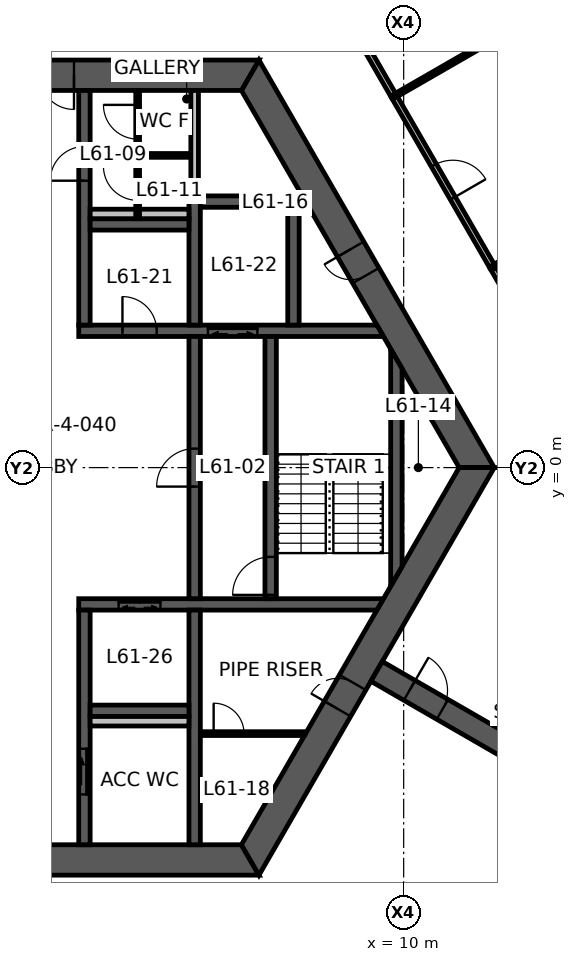
"""IFC4 building model, lengths in metres.
Left out: names, types, materials, properties, quantities, classifications, styles, units other than length and angle.
Written with IfcOpenShell. Run it as: python <this file> out.ifc"""

import sys

from ifc_helpers import new_model, si_unit, direction, frame, frame_2d, origin, place, context, subcontext, project, spatial, polyline, rectangle, outline, extrude, element, fill, save


model = new_model("IFC4")
c1 = context("Model", 3, precision=1e-05, world=origin(), true_north=direction((0.0, 1.0)))
c2 = subcontext(c1, "Body", "Model", "MODEL_VIEW")
j1 = project(units=[si_unit("LENGTHUNIT", "METRE"), si_unit("PLANEANGLEUNIT", "RADIAN")], contexts=[c1])
p1 = place(None, origin())
s1 = spatial("IfcSite", under=j1, at=p1, CompositionType="ELEMENT")
p2 = place(p1, origin())
s2 = spatial("IfcBuilding", under=s1, at=p2, CompositionType="ELEMENT")
p3 = place(p2, frame((0.0, 0.0, 244.0)))
s3 = spatial("IfcBuildingStorey", under=s2, at=p3, CompositionType="ELEMENT", Elevation=244.0)
p4 = place(p3, frame((11.922, 0.0, 0.0), z_axis=(0.0, 0.0, 1.0), x_axis=(-0.500004296715, 0.866022923061, 0.0)))
e1 = element("IfcWall", 1, at=p4, inside=s3, PredefinedType="SHEAR", context=c2, shape_type="SweptSolid", body=[
    extrude(outline(polyline([(-0.231, -0.4), (5.835, -0.4), (6.635, -0.4), (12.153, -0.4), (11.691, 0.4), (6.635, 0.4), (5.835, 0.4), (0.231, 0.4), (-0.231, -0.4)])), origin(), (0.0, 0.0, 1.0), 3.9),
])
p5 = place(p4, frame((5.835, 0.0, 0.0)))
e2 = element("IfcOpeningElement", 2, at=p5, cuts=e1, PredefinedType="OPENING", context=c2, shape_type="SweptSolid", body=[
    extrude(rectangle(XDim=0.8, YDim=2.1, at=frame_2d((0.4, 1.05))), frame((0.0, 0.41, 0.0), z_axis=(0.0, -1.0, 0.0), x_axis=(1.0, 0.0, 0.0)), (0.0, 0.0, 1.0), 0.82),
])
p6 = place(p3, frame((5.961, 10.325, 0.0), z_axis=(0.0, 0.0, 1.0), x_axis=(-1.0, 0.0, 0.0)))
e3 = element("IfcWall", 3, at=p6, inside=s3, PredefinedType="SHEAR", context=c2, shape_type="SweptSolid", body=[
    extrude(outline(polyline([(-0.231, -0.4), (4.636, -0.4), (5.536, -0.4), (6.386, -0.4), (7.286, -0.4), (12.153, -0.4), (11.691, 0.4), (7.286, 0.4), (6.386, 0.4), (5.536, 0.4), (4.636, 0.4), (0.231, 0.4), (-0.231, -0.4)])), origin(), (0.0, 0.0, 1.0), 3.9),
])
p7 = place(p6, frame((6.386, 0.0, 0.0)))
e4 = element("IfcOpeningElement", 4, at=p7, cuts=e3, PredefinedType="OPENING", context=c2, shape_type="SweptSolid", body=[
    extrude(rectangle(XDim=0.9, YDim=2.1, at=frame_2d((0.45, 1.05))), frame((0.0, 0.41, 0.0), z_axis=(0.0, -1.0, 0.0), x_axis=(1.0, 0.0, 0.0)), (0.0, 0.0, 1.0), 0.82),
])
p8 = place(p6, frame((4.636, 0.0, 0.0)))
e5 = element("IfcOpeningElement", 5, at=p8, cuts=e3, PredefinedType="OPENING", context=c2, shape_type="SweptSolid", body=[
    extrude(rectangle(XDim=0.9, YDim=2.1, at=frame_2d((0.45, 1.05))), frame((0.0, 0.41, 0.0), z_axis=(0.0, -1.0, 0.0), x_axis=(1.0, 0.0, 0.0)), (0.0, 0.0, 1.0), 0.82),
])
p9 = place(p3, frame((-5.961, -10.325, 0.0), z_axis=(0.0, 0.0, 1.0), x_axis=(1.0, 0.0, 0.0)))
e6 = element("IfcWall", 6, at=p9, inside=s3, PredefinedType="SHEAR", context=c2, shape_type="SweptSolid", body=[
    extrude(outline(polyline([(-0.231, -0.4), (5.461, -0.4), (6.461, -0.4), (12.153, -0.4), (11.691, 0.4), (6.461, 0.4), (5.461, 0.4), (0.231, 0.4), (-0.231, -0.4)])), origin(), (0.0, 0.0, 1.0), 3.9),
])
p10 = place(p9, frame((5.461, 0.0, 0.0)))
e7 = element("IfcOpeningElement", 7, at=p10, cuts=e6, PredefinedType="OPENING", context=c2, shape_type="SweptSolid", body=[
    extrude(rectangle(XDim=1.0, YDim=2.1, at=frame_2d((0.5, 1.05))), frame((0.0, 0.41, 0.0), z_axis=(0.0, -1.0, 0.0), x_axis=(1.0, 0.0, 0.0)), (0.0, 0.0, 1.0), 0.82),
])
p11 = place(p3, frame((5.961, -10.325, 0.0), z_axis=(0.0, 0.0, 1.0), x_axis=(0.500004296715, 0.866022923061, 0.0)))
e8 = element("IfcWall", 8, at=p11, inside=s3, PredefinedType="SHEAR", context=c2, shape_type="SweptSolid", body=[
    extrude(outline(polyline([(-0.231, -0.4), (4.594, -0.4), (5.394, -0.4), (12.153, -0.4), (11.691, 0.4), (5.394, 0.4), (4.594, 0.4), (0.231, 0.4), (-0.231, -0.4)])), origin(), (0.0, 0.0, 1.0), 3.9),
])
p12 = place(p11, frame((4.594, 0.0, 0.0)))
e9 = element("IfcOpeningElement", 9, at=p12, cuts=e8, PredefinedType="OPENING", context=c2, shape_type="SweptSolid", body=[
    extrude(rectangle(XDim=0.8, YDim=2.1, at=frame_2d((0.4, 1.05))), frame((0.0, 0.41, 0.0), z_axis=(0.0, -1.0, 0.0), x_axis=(1.0, 0.0, 0.0)), (0.0, 0.0, 1.0), 0.82),
])
p13 = place(p3, frame((9.288, -5.363, 0.0), z_axis=(0.0, 0.0, 1.0), x_axis=(0.866031736626, -0.499989031036, 0.0)))
e10 = element("IfcWall", 10, at=p13, inside=s3, PredefinedType="SHEAR", context=c2, shape_type="SweptSolid", body=[
    extrude(rectangle(XDim=7.796, YDim=0.6, at=frame_2d((3.898, 0.0))), origin(), (0.0, 0.0, 1.0), 3.9),
])
p14 = place(p13, frame((1.0, 0.0, 0.0)))
e11 = element("IfcOpeningElement", 11, at=p14, cuts=e10, PredefinedType="OPENING", context=c2, shape_type="SweptSolid", body=[
    extrude(rectangle(XDim=1.0, YDim=2.1, at=frame_2d((0.5, 1.05))), frame((0.0, 0.31, 0.0), z_axis=(0.0, -1.0, 0.0), x_axis=(1.0, 0.0, 0.0)), (0.0, 0.0, 1.0), 0.62),
])
p15 = place(p3, frame((1.45, 3.6, 0.0), z_axis=(0.0, 0.0, 1.0), x_axis=(1.0, 0.0, 0.0)))
e12 = element("IfcWall", 12, at=p15, inside=s3, PredefinedType="SHEAR", context=c2, shape_type="SweptSolid", body=[
    extrude(outline(polyline([(0.0, -0.15), (1.15, -0.15), (2.05, -0.15), (3.4, -0.15), (4.7, -0.15), (8.019, -0.15), (7.845, 0.15), (4.7, 0.15), (3.4, 0.15), (2.05, 0.15), (1.15, 0.15), (0.0, 0.15), (0.0, -0.15)])), origin(), (0.0, 0.0, 1.0), 3.9),
])
p16 = place(p15, frame((1.15, 0.0, 0.0)))
e13 = element("IfcOpeningElement", 13, at=p16, cuts=e12, PredefinedType="OPENING", context=c2, shape_type="SweptSolid", body=[
    extrude(rectangle(XDim=0.9, YDim=2.1, at=frame_2d((0.45, 1.05))), frame((0.0, 0.16, 0.0), z_axis=(0.0, -1.0, 0.0), x_axis=(1.0, 0.0, 0.0)), (0.0, 0.0, 1.0), 0.32),
])
p17 = place(p15, frame((3.4, 0.0, 0.0)))
e14 = element("IfcOpeningElement", 14, at=p17, cuts=e12, PredefinedType="OPENING", context=c2, shape_type="SweptSolid", body=[
    extrude(rectangle(XDim=1.3, YDim=2.1, at=frame_2d((0.65, 1.05))), frame((0.0, 0.16, 0.0), z_axis=(0.0, -1.0, 0.0), x_axis=(1.0, 0.0, 0.0)), (0.0, 0.0, 1.0), 0.32),
])
p18 = place(p3, frame((1.45, -3.6, 0.0), z_axis=(0.0, 0.0, 1.0), x_axis=(1.0, 0.0, 0.0)))
e15 = element("IfcWall", 15, at=p18, inside=s3, PredefinedType="SHEAR", context=c2, shape_type="SweptSolid", body=[
    extrude(outline(polyline([(0.0, -0.15), (1.05, -0.15), (2.15, -0.15), (7.845, -0.15), (8.019, 0.15), (2.15, 0.15), (1.05, 0.15), (0.0, 0.15), (0.0, -0.15)])), origin(), (0.0, 0.0, 1.0), 3.9),
])
p19 = place(p18, frame((1.05, 0.0, 0.0)))
e16 = element("IfcOpeningElement", 16, at=p19, cuts=e15, PredefinedType="OPENING", context=c2, shape_type="SweptSolid", body=[
    extrude(rectangle(XDim=1.1, YDim=2.1, at=frame_2d((0.55, 1.05))), frame((0.0, 0.16, 0.0), z_axis=(0.0, -1.0, 0.0), x_axis=(1.0, 0.0, 0.0)), (0.0, 0.0, 1.0), 0.32),
])
p20 = place(p3, frame((1.6, 3.75, 0.0), z_axis=(0.0, 0.0, 1.0), x_axis=(0.0, 1.0, 0.0)))
e17 = element("IfcWall", 17, at=p20, inside=s3, PredefinedType="SHEAR", context=c2, shape_type="SweptSolid", body=[
    extrude(rectangle(XDim=6.175, YDim=0.3, at=frame_2d((3.087, 0.0))), origin(), (0.0, 0.0, 1.0), 3.9),
])
p21 = place(p20, frame((3.8, 0.0, 0.0)))
e18 = element("IfcOpeningElement", 18, at=p21, cuts=e17, PredefinedType="OPENING", context=c2, shape_type="SweptSolid", body=[
    extrude(rectangle(XDim=0.9, YDim=2.1, at=frame_2d((0.45, 1.05))), frame((0.0, 0.16, 0.0), z_axis=(0.0, -1.0, 0.0), x_axis=(1.0, 0.0, 0.0)), (0.0, 0.0, 1.0), 0.32),
])
p22 = place(p3, frame((1.6, -3.75, 0.0), z_axis=(0.0, 0.0, 1.0), x_axis=(0.0, -1.0, 0.0)))
e19 = element("IfcWall", 19, at=p22, inside=s3, PredefinedType="SHEAR", context=c2, shape_type="SweptSolid", body=[
    extrude(rectangle(XDim=6.175, YDim=0.3, at=frame_2d((3.087, 0.0))), origin(), (0.0, 0.0, 1.0), 3.9),
])
p23 = place(p22, frame((3.65, 0.0, 0.0)))
e20 = element("IfcOpeningElement", 20, at=p23, cuts=e19, PredefinedType="OPENING", context=c2, shape_type="SweptSolid", body=[
    extrude(rectangle(XDim=1.2, YDim=2.1, at=frame_2d((0.6, 1.05))), frame((0.0, 0.16, 0.0), z_axis=(0.0, -1.0, 0.0), x_axis=(1.0, 0.0, 0.0)), (0.0, 0.0, 1.0), 0.32),
])
p24 = place(p3, frame((4.5, -3.45, 0.0), z_axis=(0.0, 0.0, 1.0), x_axis=(0.0, 1.0, 0.0)))
e21 = element("IfcWall", 21, at=p24, inside=s3, PredefinedType="SHEAR", context=c2, shape_type="SweptSolid", body=[
    extrude(rectangle(XDim=6.9, YDim=0.3, at=frame_2d((3.45, 0.0))), origin(), (0.0, 0.0, 1.0), 3.9),
])
p25 = place(p24, frame((2.95, 0.0, 0.0)))
e22 = element("IfcOpeningElement", 22, at=p25, cuts=e21, PredefinedType="OPENING", context=c2, shape_type="SweptSolid", body=[
    extrude(rectangle(XDim=1.0, YDim=2.1, at=frame_2d((0.5, 1.05))), frame((0.0, 0.16, 0.0), z_axis=(0.0, -1.0, 0.0), x_axis=(1.0, 0.0, 0.0)), (0.0, 0.0, 1.0), 0.32),
])
p26 = place(p3, frame((6.5, -3.45, 0.0), z_axis=(0.0, 0.0, 1.0), x_axis=(0.0, 1.0, 0.0)))
e23 = element("IfcWall", 23, at=p26, inside=s3, PredefinedType="SHEAR", context=c2, shape_type="SweptSolid", body=[
    extrude(rectangle(XDim=6.9, YDim=0.3, at=frame_2d((3.45, 0.0))), origin(), (0.0, 0.0, 1.0), 3.9),
])
p27 = place(p26, frame((0.1, 0.0, 0.0)))
e24 = element("IfcOpeningElement", 24, at=p27, cuts=e23, PredefinedType="OPENING", context=c2, shape_type="SweptSolid", body=[
    extrude(rectangle(XDim=1.0, YDim=2.1, at=frame_2d((0.5, 1.05))), frame((0.0, 0.16, 0.0), z_axis=(0.0, -1.0, 0.0), x_axis=(1.0, 0.0, 0.0)), (0.0, 0.0, 1.0), 0.32),
])
p28 = place(p3, frame((4.5, 3.75, 0.0), z_axis=(0.0, 0.0, 1.0), x_axis=(0.0, 1.0, 0.0)))
e25 = element("IfcWall", 25, at=p28, inside=s3, PredefinedType="SHEAR", context=c2, shape_type="SweptSolid", body=[
    extrude(rectangle(XDim=3.4, YDim=0.3, at=frame_2d((1.7, 0.0))), origin(), (0.0, 0.0, 1.0), 3.9),
])
p29 = place(p3, frame((4.5, -3.75, 0.0), z_axis=(0.0, 0.0, 1.0), x_axis=(0.0, -1.0, 0.0)))
e26 = element("IfcWall", 26, at=p29, inside=s3, PredefinedType="SHEAR", context=c2, shape_type="SweptSolid", body=[
    extrude(rectangle(XDim=6.175, YDim=0.3, at=frame_2d((3.087, 0.0))), origin(), (0.0, 0.0, 1.0), 3.9),
])
for number, where, z_axis, x_axis in (
    (27, (1.75, 6.4, 0.0), (0.0, 0.0, 1.0), (1.0, 0.0, 0.0)),
    (28, (1.75, -6.4, 0.0), (0.0, 0.0, 1.0), (1.0, 0.0, 0.0)),
    (29, (4.65, 7.0, 0.0), (0.0, 0.0, 1.0), (1.0, 0.0, 0.0)),
):
    element("IfcWall", number, at=place(p3, frame(where, z_axis=z_axis, x_axis=x_axis)), inside=s3, PredefinedType="SHEAR", context=c2, shape_type="SweptSolid", body=[
        extrude(rectangle(XDim=2.6, YDim=0.3, at=frame_2d((1.3, 0.0))), origin(), (0.0, 0.0, 1.0), 3.9),
    ])
p30 = place(p3, frame((7.1, 3.75, 0.0), z_axis=(0.0, 0.0, 1.0), x_axis=(0.0, 1.0, 0.0)))
e30 = element("IfcWall", 30, at=p30, inside=s3, PredefinedType="SHEAR", context=c2, shape_type="SweptSolid", body=[
    extrude(rectangle(XDim=3.1, YDim=0.3, at=frame_2d((1.55, 0.0))), origin(), (0.0, 0.0, 1.0), 3.9),
])
p31 = place(p3, frame((9.808, -2.862, 0.0), z_axis=(0.0, 0.0, 1.0), x_axis=(0.0, 1.0, 0.0)))
e31 = element("IfcWall", 31, at=p31, inside=s3, PredefinedType="SHEAR", context=c2, shape_type="SweptSolid", body=[
    extrude(outline(polyline([(0.26, -0.15), (5.465, -0.15), (5.984, 0.15), (-0.26, 0.15), (0.26, -0.15)])), origin(), (0.0, 0.0, 1.0), 3.9),
])
p32 = place(p3, frame((4.5, 7.15, 0.0), z_axis=(0.0, 0.0, 1.0), x_axis=(0.0, 1.0, 0.0)))
e32 = element("IfcWall", 32, at=p32, inside=s3, PredefinedType="STANDARD", context=c2, shape_type="SweptSolid", body=[
    extrude(rectangle(XDim=2.775, YDim=0.2, at=frame_2d((1.388, 0.0))), origin(), (0.0, 0.0, 1.0), 3.9),
])
for number, where, z_axis, x_axis in (
    (33, (1.75, 6.675, 0.0), (0.0, 0.0, 1.0), (1.0, 0.0, 0.0)),
    (34, (1.75, -6.675, 0.0), (0.0, 0.0, 1.0), (1.0, 0.0, 0.0)),
):
    element("IfcWall", number, at=place(p3, frame(where, z_axis=z_axis, x_axis=x_axis)), inside=s3, PredefinedType="PLUMBINGWALL", context=c2, shape_type="SweptSolid", body=[
        extrude(rectangle(XDim=2.6, YDim=0.25, at=frame_2d((1.3, 0.0))), origin(), (0.0, 0.0, 1.0), 3.9),
    ])
p33 = place(p3, frame((3.0, 6.55, 0.0), z_axis=(0.0, 0.0, 1.0), x_axis=(0.0, 1.0, 0.0)))
e35 = element("IfcWall", 35, at=p33, inside=s3, PredefinedType="PARTITIONING", context=c2, shape_type="SweptSolid", body=[
    extrude(rectangle(XDim=3.375, YDim=0.1, at=frame_2d((1.688, 0.0))), origin(), (0.0, 0.0, 1.0), 2.95),
])
p34 = place(p33, frame((2.095, 0.0, 0.0)))
e36 = element("IfcOpeningElement", 36, at=p34, cuts=e35, PredefinedType="OPENING", context=c2, shape_type="SweptSolid", body=[
    extrude(rectangle(XDim=0.9, YDim=2.1, at=frame_2d((0.45, 1.05))), frame((0.0, 0.06, 0.0), z_axis=(0.0, -1.0, 0.0), x_axis=(1.0, 0.0, 0.0)), (0.0, 0.0, 1.0), 0.12),
])
p35 = place(p33, frame((0.483, 0.0, 0.0)))
e37 = element("IfcOpeningElement", 37, at=p35, cuts=e35, PredefinedType="OPENING", context=c2, shape_type="SweptSolid", body=[
    extrude(rectangle(XDim=0.9, YDim=2.1, at=frame_2d((0.45, 1.05))), frame((0.0, 0.06, 0.0), z_axis=(0.0, -1.0, 0.0), x_axis=(1.0, 0.0, 0.0)), (0.0, 0.0, 1.0), 0.12),
])
p36 = place(p3, frame((3.05, 8.215, 0.0), z_axis=(0.0, 0.0, 1.0), x_axis=(1.0, 0.0, 0.0)))
e38 = element("IfcWall", 38, at=p36, inside=s3, PredefinedType="PARTITIONING", context=c2, shape_type="SweptSolid", body=[
    extrude(rectangle(XDim=1.3, YDim=0.1, at=frame_2d((0.65, 0.0))), origin(), (0.0, 0.0, 1.0), 2.95),
])
p37 = place(p3, frame((4.65, -7.0, 0.0), z_axis=(0.0, 0.0, 1.0), x_axis=(1.0, 0.0, 0.0)))
e39 = element("IfcWall", 39, at=p37, inside=s3, PredefinedType="PARTITIONING", context=c2, shape_type="SweptSolid", body=[
    extrude(outline(polyline([(0.0, -0.05), (0.35, -0.05), (1.15, -0.05), (2.74, -0.05), (2.769, 0.0), (2.775, 0.05), (1.15, 0.05), (0.35, 0.05), (0.0, 0.05), (0.0, -0.05)])), origin(), (0.0, 0.0, 1.0), 2.95),
])
p38 = place(p37, frame((0.35, 0.0, 0.0)))
e40 = element("IfcOpeningElement", 40, at=p38, cuts=e39, PredefinedType="OPENING", context=c2, shape_type="SweptSolid", body=[
    extrude(rectangle(XDim=0.8, YDim=2.1, at=frame_2d((0.4, 1.05))), frame((0.0, 0.06, 0.0), z_axis=(0.0, -1.0, 0.0), x_axis=(1.0, 0.0, 0.0)), (0.0, 0.0, 1.0), 0.12),
])
p39 = place(p3, frame((12.337, 5.281, 0.0), z_axis=(0.0, 0.0, 1.0), x_axis=(0.499977562641, -0.866038357612, 0.0)))
e41 = element("IfcWall", 41, at=p39, inside=s3, PredefinedType="PARTITIONING", context=c2, shape_type="SweptSolid", body=[
    extrude(rectangle(XDim=3.01, YDim=0.15, at=frame_2d((1.505, 0.0))), origin(), (0.0, 0.0, 1.0), 2.95),
])
p40 = place(p3, frame((8.08, 12.656, 0.0), z_axis=(0.0, 0.0, 1.0), x_axis=(0.499990242038, -0.866031037473, 0.0)))
e42 = element("IfcWall", 42, at=p40, inside=s3, PredefinedType="PARTITIONING", context=c2, shape_type="SweptSolid", body=[
    extrude(rectangle(XDim=3.341, YDim=0.15, at=frame_2d((1.67, 0.0))), origin(), (0.0, 0.0, 1.0), 2.95),
])
p41 = place(p3, frame((9.745, 9.771, 0.0), z_axis=(0.0, 0.0, 1.0), x_axis=(0.499981525251, -0.866036069923, 0.0)))
e43 = element("IfcWall", 43, at=p41, inside=s3, PredefinedType="PARTITIONING", context=c2, shape_type="SweptSolid", body=[
    extrude(rectangle(XDim=5.194, YDim=0.15, at=frame_2d((2.597, 0.0))), origin(), (0.0, 0.0, 1.0), 2.95),
])
p42 = place(p41, frame((2.097, 0.0, 0.0)))
e44 = element("IfcOpeningElement", 44, at=p42, cuts=e43, PredefinedType="OPENING", context=c2, shape_type="SweptSolid", body=[
    extrude(rectangle(XDim=1.0, YDim=2.1, at=frame_2d((0.5, 1.05))), frame((0.0, 0.085, 0.0), z_axis=(0.0, -1.0, 0.0), x_axis=(1.0, 0.0, 0.0)), (0.0, 0.0, 1.0), 0.17),
])
p43 = place(p3, frame((12.342, 5.273, 0.0), z_axis=(0.0, 0.0, 1.0), x_axis=(0.865195372903, 0.501434907746, 0.0)))
e45 = element("IfcWall", 45, at=p43, inside=s3, PredefinedType="PARTITIONING", context=c2, shape_type="SweptSolid", body=[
    extrude(rectangle(XDim=2.8, YDim=0.1, at=frame_2d((1.4, 0.0))), origin(), (0.0, 0.0, 1.0), 2.95),
])
p44 = place(p3, frame((13.623, 12.004, 0.0), z_axis=(0.0, 0.0, 1.0), x_axis=(-0.866535947524, -0.499114667835, 0.0)))
e46 = element("IfcWall", 46, at=p44, inside=s3, PredefinedType="PARTITIONING", context=c2, shape_type="SweptSolid", body=[
    extrude(rectangle(XDim=4.475, YDim=0.1, at=frame_2d((2.238, 0.0))), origin(), (0.0, 0.0, 1.0), 2.95),
])
p45 = place(p8, origin())
e47 = element("IfcDoor", 47, at=p45, inside=s3, OperationType="SINGLE_SWING_LEFT", PredefinedType="DOOR", context=c2, shape_type="SweptSolid", body=[
    extrude(rectangle(XDim=0.9, YDim=2.1, at=frame_2d((0.45, 1.05))), frame((0.0, 0.025, 0.0), z_axis=(0.0, -1.0, 0.0), x_axis=(1.0, 0.0, 0.0)), (0.0, 0.0, 1.0), 0.05),
])
fill(e5, e47)
p46 = place(p5, origin())
e48 = element("IfcDoor", 48, at=p46, inside=s3, OperationType="SINGLE_SWING_RIGHT", PredefinedType="DOOR", context=c2, shape_type="SweptSolid", body=[
    extrude(rectangle(XDim=0.8, YDim=2.1, at=frame_2d((0.4, 1.05))), frame((0.0, 0.025, 0.0), z_axis=(0.0, -1.0, 0.0), x_axis=(1.0, 0.0, 0.0)), (0.0, 0.0, 1.0), 0.05),
])
fill(e2, e48)
p47 = place(p12, origin())
e49 = element("IfcDoor", 49, at=p47, inside=s3, OperationType="SINGLE_SWING_LEFT", PredefinedType="DOOR", context=c2, shape_type="SweptSolid", body=[
    extrude(rectangle(XDim=0.8, YDim=2.1, at=frame_2d((0.4, 1.05))), frame((0.0, 0.025, 0.0), z_axis=(0.0, -1.0, 0.0), x_axis=(1.0, 0.0, 0.0)), (0.0, 0.0, 1.0), 0.05),
])
fill(e9, e49)
p48 = place(p25, origin())
e50 = element("IfcDoor", 50, at=p48, inside=s3, OperationType="SINGLE_SWING_LEFT", PredefinedType="DOOR", context=c2, shape_type="SweptSolid", body=[
    extrude(rectangle(XDim=1.0, YDim=2.1, at=frame_2d((0.5, 1.05))), frame((0.0, 0.025, 0.0), z_axis=(0.0, -1.0, 0.0), x_axis=(1.0, 0.0, 0.0)), (0.0, 0.0, 1.0), 0.05),
])
fill(e22, e50)
p49 = place(p27, origin())
e51 = element("IfcDoor", 51, at=p49, inside=s3, OperationType="SINGLE_SWING_LEFT", PredefinedType="DOOR", context=c2, shape_type="SweptSolid", body=[
    extrude(rectangle(XDim=1.0, YDim=2.1, at=frame_2d((0.5, 1.05))), frame((0.0, 0.025, 0.0), z_axis=(0.0, -1.0, 0.0), x_axis=(1.0, 0.0, 0.0)), (0.0, 0.0, 1.0), 0.05),
])
fill(e24, e51)
p50 = place(p21, origin())
e52 = element("IfcDoor", 52, at=p50, inside=s3, OperationType="SINGLE_SWING_LEFT", PredefinedType="DOOR", context=c2, shape_type="SweptSolid", body=[
    extrude(rectangle(XDim=0.9, YDim=2.1, at=frame_2d((0.45, 1.05))), frame((0.0, 0.025, 0.0), z_axis=(0.0, -1.0, 0.0), x_axis=(1.0, 0.0, 0.0)), (0.0, 0.0, 1.0), 0.05),
])
fill(e18, e52)
p51 = place(p23, origin())
e53 = element("IfcDoor", 53, at=p51, inside=s3, OperationType="SLIDING_TO_LEFT", PredefinedType="DOOR", context=c2, shape_type="SweptSolid", body=[
    extrude(rectangle(XDim=1.2, YDim=2.1, at=frame_2d((0.6, 1.05))), frame((0.0, 0.025, 0.0), z_axis=(0.0, -1.0, 0.0), x_axis=(1.0, 0.0, 0.0)), (0.0, 0.0, 1.0), 0.05),
])
fill(e20, e53)
p52 = place(p16, origin())
e54 = element("IfcDoor", 54, at=p52, inside=s3, OperationType="SINGLE_SWING_LEFT", PredefinedType="DOOR", context=c2, shape_type="SweptSolid", body=[
    extrude(rectangle(XDim=0.9, YDim=2.1, at=frame_2d((0.45, 1.05))), frame((0.0, 0.025, 0.0), z_axis=(0.0, -1.0, 0.0), x_axis=(1.0, 0.0, 0.0)), (0.0, 0.0, 1.0), 0.05),
])
fill(e13, e54)
p53 = place(p14, origin())
e55 = element("IfcDoor", 55, at=p53, inside=s3, OperationType="SINGLE_SWING_LEFT", PredefinedType="DOOR", context=c2, shape_type="SweptSolid", body=[
    extrude(rectangle(XDim=1.0, YDim=2.1, at=frame_2d((0.5, 1.05))), frame((0.0, 0.025, 0.0), z_axis=(0.0, -1.0, 0.0), x_axis=(1.0, 0.0, 0.0)), (0.0, 0.0, 1.0), 0.05),
])
fill(e11, e55)
p54 = place(p34, origin())
e56 = element("IfcDoor", 56, at=p54, inside=s3, OperationType="SINGLE_SWING_RIGHT", PredefinedType="DOOR", context=c2, shape_type="SweptSolid", body=[
    extrude(rectangle(XDim=0.9, YDim=2.1, at=frame_2d((0.45, 1.05))), frame((0.0, 0.025, 0.0), z_axis=(0.0, -1.0, 0.0), x_axis=(1.0, 0.0, 0.0)), (0.0, 0.0, 1.0), 0.05),
])
fill(e36, e56)
p55 = place(p35, origin())
e57 = element("IfcDoor", 57, at=p55, inside=s3, OperationType="SINGLE_SWING_RIGHT", PredefinedType="DOOR", context=c2, shape_type="SweptSolid", body=[
    extrude(rectangle(XDim=0.9, YDim=2.1, at=frame_2d((0.45, 1.05))), frame((0.0, 0.025, 0.0), z_axis=(0.0, -1.0, 0.0), x_axis=(1.0, 0.0, 0.0)), (0.0, 0.0, 1.0), 0.05),
])
fill(e37, e57)
p56 = place(p38, origin())
e58 = element("IfcDoor", 58, at=p56, inside=s3, OperationType="SINGLE_SWING_LEFT", PredefinedType="DOOR", context=c2, shape_type="SweptSolid", body=[
    extrude(rectangle(XDim=0.8, YDim=2.1, at=frame_2d((0.4, 1.05))), frame((0.0, 0.025, 0.0), z_axis=(0.0, -1.0, 0.0), x_axis=(1.0, 0.0, 0.0)), (0.0, 0.0, 1.0), 0.05),
])
fill(e40, e58)
p57 = place(p42, origin())
e59 = element("IfcDoor", 59, at=p57, inside=s3, OperationType="SINGLE_SWING_RIGHT", PredefinedType="DOOR", context=c2, shape_type="SweptSolid", body=[
    extrude(rectangle(XDim=1.0, YDim=2.1, at=frame_2d((0.5, 1.05))), frame((0.0, 0.025, 0.0), z_axis=(0.0, -1.0, 0.0), x_axis=(1.0, 0.0, 0.0)), (0.0, 0.0, 1.0), 0.05),
])
fill(e44, e59)
p58 = place(p19, origin())
e60 = element("IfcDoor", 60, at=p58, inside=s3, OperationType="DOUBLE_DOOR_SLIDING", PredefinedType="DOOR", context=c2, shape_type="SweptSolid", body=[
    extrude(rectangle(XDim=1.1, YDim=2.1, at=frame_2d((0.55, 1.05))), frame((0.0, 0.025, 0.0), z_axis=(0.0, -1.0, 0.0), x_axis=(1.0, 0.0, 0.0)), (0.0, 0.0, 1.0), 0.05),
])
fill(e16, e60)
p59 = place(p17, origin())
e61 = element("IfcDoor", 61, at=p59, inside=s3, OperationType="DOUBLE_DOOR_SLIDING", PredefinedType="DOOR", context=c2, shape_type="SweptSolid", body=[
    extrude(rectangle(XDim=1.3, YDim=2.1, at=frame_2d((0.65, 1.05))), frame((0.0, 0.025, 0.0), z_axis=(0.0, -1.0, 0.0), x_axis=(1.0, 0.0, 0.0)), (0.0, 0.0, 1.0), 0.05),
])
fill(e14, e61)
save(model, sys.argv[1])
